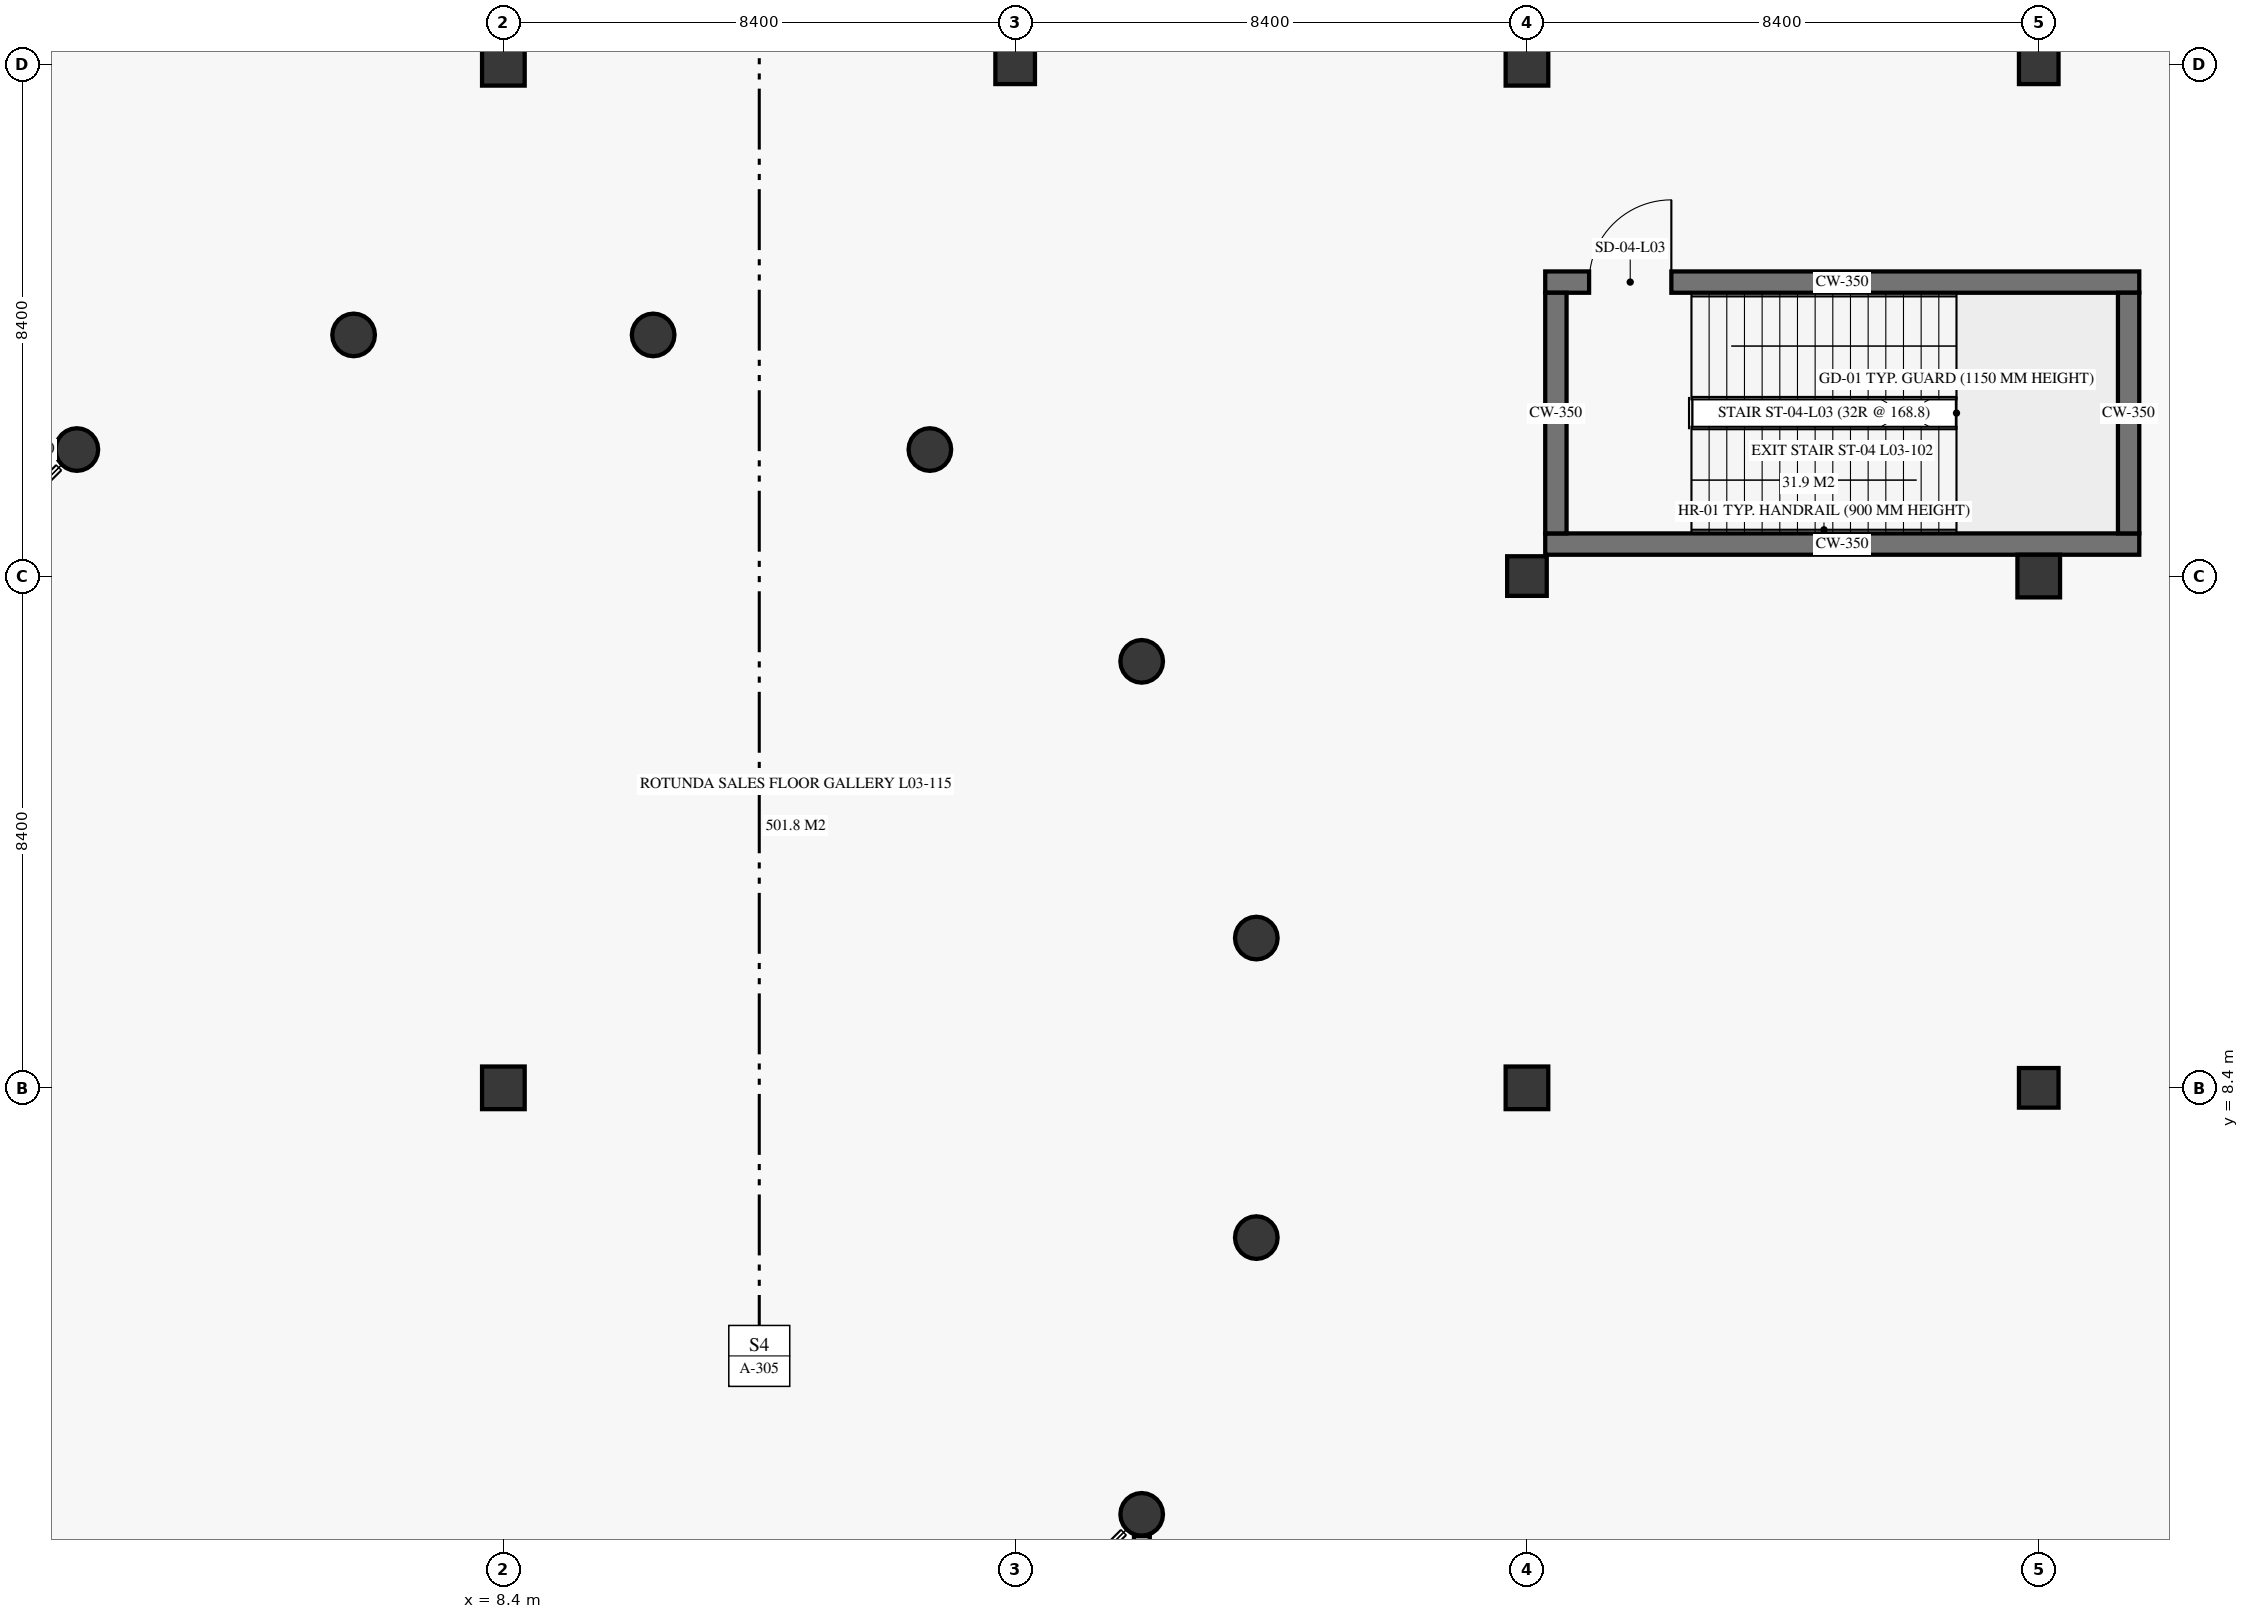
"""IFC4 building model, lengths in metres.
Left out: names, types, materials, properties, quantities, classifications, styles, units other than length and angle.
Written with IfcOpenShell. Run it as: python <this file> out.ifc"""

import sys

from ifc_helpers import new_model, si_unit, direction, frame, frame_2d, origin, origin_2d, place, context, subcontext, project, spatial, rectangle, circle, extrude, element, fill, save


model = new_model("IFC4")
c1 = context("Model", 3, precision=1e-05, world=origin(), true_north=direction((0.0, 1.0)))
c2 = subcontext(c1, "Body", "Model", "MODEL_VIEW")
j1 = project(units=[si_unit("LENGTHUNIT", "METRE"), si_unit("PLANEANGLEUNIT", "RADIAN")], contexts=[c1])
p1 = place(None, origin())
s1 = spatial("IfcSite", under=j1, at=p1, CompositionType="ELEMENT")
p2 = place(p1, origin())
s2 = spatial("IfcBuilding", under=s1, at=p2, CompositionType="ELEMENT")
p3 = place(p2, frame((0.0, 0.0, 11.4)))
s3 = spatial("IfcBuildingStorey", under=s2, at=p3, CompositionType="ELEMENT", Elevation=11.4)
for number, where, z_axis, x_axis in (
    (1, (8.4, 8.4, 0.0), (0.0, 0.0, 1.0), (1.0, 0.0, 0.0)),
    (2, (8.4, 25.2, 0.0), (0.0, 0.0, 1.0), (1.0, 0.0, 0.0)),
):
    element("IfcColumn", number, at=place(p3, frame(where, z_axis=z_axis, x_axis=x_axis)), inside=s3, PredefinedType="COLUMN", context=c2, shape_type="SweptSolid", body=[
        extrude(rectangle(XDim=0.7, YDim=0.7, at=origin_2d()), origin(), (0.0, 0.0, 1.0), 5.1),
    ])
p4 = place(p3, frame((16.8, 25.2, 0.0), z_axis=(0.0, 0.0, 1.0), x_axis=(1.0, 0.0, 0.0)))
e3 = element("IfcColumn", 3, at=p4, inside=s3, PredefinedType="COLUMN", context=c2, shape_type="SweptSolid", body=[
    extrude(rectangle(XDim=0.65, YDim=0.65, at=origin_2d()), origin(), (0.0, 0.0, 1.0), 5.1),
])
p5 = place(p3, frame((25.2, 8.4, 0.0), z_axis=(0.0, 0.0, 1.0), x_axis=(1.0, 0.0, 0.0)))
e4 = element("IfcColumn", 4, at=p5, inside=s3, PredefinedType="COLUMN", context=c2, shape_type="SweptSolid", body=[
    extrude(rectangle(XDim=0.7, YDim=0.7, at=origin_2d()), origin(), (0.0, 0.0, 1.0), 5.1),
])
p6 = place(p3, frame((25.2, 16.8, 0.0), z_axis=(0.0, 0.0, 1.0), x_axis=(1.0, 0.0, 0.0)))
e5 = element("IfcColumn", 5, at=p6, inside=s3, PredefinedType="COLUMN", context=c2, shape_type="SweptSolid", body=[
    extrude(rectangle(XDim=0.65, YDim=0.65, at=origin_2d()), origin(), (0.0, 0.0, 1.0), 5.1),
])
p7 = place(p3, frame((25.2, 25.2, 0.0), z_axis=(0.0, 0.0, 1.0), x_axis=(1.0, 0.0, 0.0)))
e6 = element("IfcColumn", 6, at=p7, inside=s3, PredefinedType="COLUMN", context=c2, shape_type="SweptSolid", body=[
    extrude(rectangle(XDim=0.7, YDim=0.7, at=origin_2d()), origin(), (0.0, 0.0, 1.0), 5.1),
])
p8 = place(p3, frame((33.6, 8.4, 0.0), z_axis=(0.0, 0.0, 1.0), x_axis=(1.0, 0.0, 0.0)))
e7 = element("IfcColumn", 7, at=p8, inside=s3, PredefinedType="COLUMN", context=c2, shape_type="SweptSolid", body=[
    extrude(rectangle(XDim=0.65, YDim=0.65, at=origin_2d()), origin(), (0.0, 0.0, 1.0), 5.1),
])
p9 = place(p3, frame((33.6, 16.8, 0.0), z_axis=(0.0, 0.0, 1.0), x_axis=(1.0, 0.0, 0.0)))
e8 = element("IfcColumn", 8, at=p9, inside=s3, PredefinedType="COLUMN", context=c2, shape_type="SweptSolid", body=[
    extrude(rectangle(XDim=0.7, YDim=0.7, at=origin_2d()), origin(), (0.0, 0.0, 1.0), 5.1),
])
p10 = place(p3, frame((33.6, 25.2, 0.0), z_axis=(0.0, 0.0, 1.0), x_axis=(1.0, 0.0, 0.0)))
e9 = element("IfcColumn", 9, at=p10, inside=s3, PredefinedType="COLUMN", context=c2, shape_type="SweptSolid", body=[
    extrude(rectangle(XDim=0.65, YDim=0.65, at=origin_2d()), origin(), (0.0, 0.0, 1.0), 5.1),
])
for number, where, z_axis, x_axis in (
    (10, (20.758, 10.858, 0.0), (0.0, 0.0, 1.0), (1.0, 0.0, 0.0)),
    (11, (18.876, 15.4, 0.0), (0.0, 0.0, 1.0), (1.0, 0.0, 0.0)),
    (12, (15.4, 18.876, 0.0), (0.0, 0.0, 1.0), (1.0, 0.0, 0.0)),
    (13, (10.858, 20.758, 0.0), (0.0, 0.0, 1.0), (1.0, 0.0, 0.0)),
    (14, (5.942, 20.758, 0.0), (0.0, 0.0, 1.0), (1.0, 0.0, 0.0)),
    (15, (1.4, 18.876, 0.0), (0.0, 0.0, 1.0), (1.0, 0.0, 0.0)),
    (16, (18.876, 1.4, 0.0), (0.0, 0.0, 1.0), (1.0, 0.0, 0.0)),
    (17, (20.758, 5.942, 0.0), (0.0, 0.0, 1.0), (1.0, 0.0, 0.0)),
):
    element("IfcColumn", number, at=place(p3, frame(where, z_axis=z_axis, x_axis=x_axis)), inside=s3, PredefinedType="COLUMN", context=c2, shape_type="SweptSolid", body=[
        extrude(circle(Radius=0.35, at=origin_2d()), origin(), (0.0, 0.0, 1.0), 5.1),
    ])
for number, where, z_axis, x_axis in (
    (18, (0.15, 18.88, 0.0), (0.0, 0.0, 1.0), (1.0, 0.0, 0.0)),
    (19, (18.88, 0.15, 0.0), (0.0, 0.0, 1.0), (0.0, 1.0, 0.0)),
):
    element("IfcWall", number, at=place(p3, frame(where, z_axis=z_axis, x_axis=x_axis)), inside=s3, PredefinedType="SOLIDWALL", context=c2, shape_type="SweptSolid", body=[
        extrude(rectangle(XDim=0.896, YDim=0.26, at=frame_2d((0.448, 0.0))), origin(), (0.0, 0.0, 1.0), 4.38),
    ])
p11 = place(p3, frame((25.5, 17.325, 0.0), z_axis=(0.0, 0.0, 1.0), x_axis=(1.0, 0.0, 0.0)))
e20 = element("IfcWall", 20, at=p11, inside=s3, PredefinedType="SHEAR", context=c2, shape_type="SweptSolid", body=[
    extrude(rectangle(XDim=9.75, YDim=0.35, at=frame_2d((4.875, 0.0))), origin(), (0.0, 0.0, 1.0), 5.1),
])
p12 = place(p3, frame((25.5, 21.625, 0.0), z_axis=(0.0, 0.0, 1.0), x_axis=(1.0, 0.0, 0.0)))
e21 = element("IfcWall", 21, at=p12, inside=s3, PredefinedType="SHEAR", context=c2, shape_type="SweptSolid", body=[
    extrude(rectangle(XDim=9.75, YDim=0.35, at=frame_2d((4.875, 0.0))), origin(), (0.0, 0.0, 1.0), 5.1),
])
p13 = place(p12, frame((0.72, 0.0, 0.0)))
e22 = element("IfcOpeningElement", 22, at=p13, cuts=e21, PredefinedType="OPENING", context=c2, shape_type="SweptSolid", body=[
    extrude(rectangle(XDim=1.35, YDim=2.25, at=frame_2d((0.675, 1.125))), frame((0.0, 0.185, 0.0), z_axis=(0.0, -1.0, 0.0), x_axis=(1.0, 0.0, 0.0)), (0.0, 0.0, 1.0), 0.37),
])
for number, where, z_axis, x_axis in (
    (23, (25.675, 17.5, 0.0), (0.0, 0.0, 1.0), (0.0, 1.0, 0.0)),
    (24, (35.075, 17.5, 0.0), (0.0, 0.0, 1.0), (0.0, 1.0, 0.0)),
):
    element("IfcWall", number, at=place(p3, frame(where, z_axis=z_axis, x_axis=x_axis)), inside=s3, PredefinedType="SHEAR", context=c2, shape_type="SweptSolid", body=[
        extrude(rectangle(XDim=3.95, YDim=0.35, at=frame_2d((1.975, 0.0))), origin(), (0.0, 0.0, 1.0), 5.1),
    ])
p14 = place(p13, origin())
e25 = element("IfcDoor", 25, at=p14, inside=s3, OperationType="SINGLE_SWING_RIGHT", PredefinedType="DOOR", context=c2, shape_type="SweptSolid", body=[
    extrude(rectangle(XDim=1.35, YDim=2.25, at=frame_2d((0.675, 1.125))), frame((0.0, 0.025, 0.0), z_axis=(0.0, -1.0, 0.0), x_axis=(1.0, 0.0, 0.0)), (0.0, 0.0, 1.0), 0.05),
])
fill(e22, e25)
save(model, sys.argv[1])
